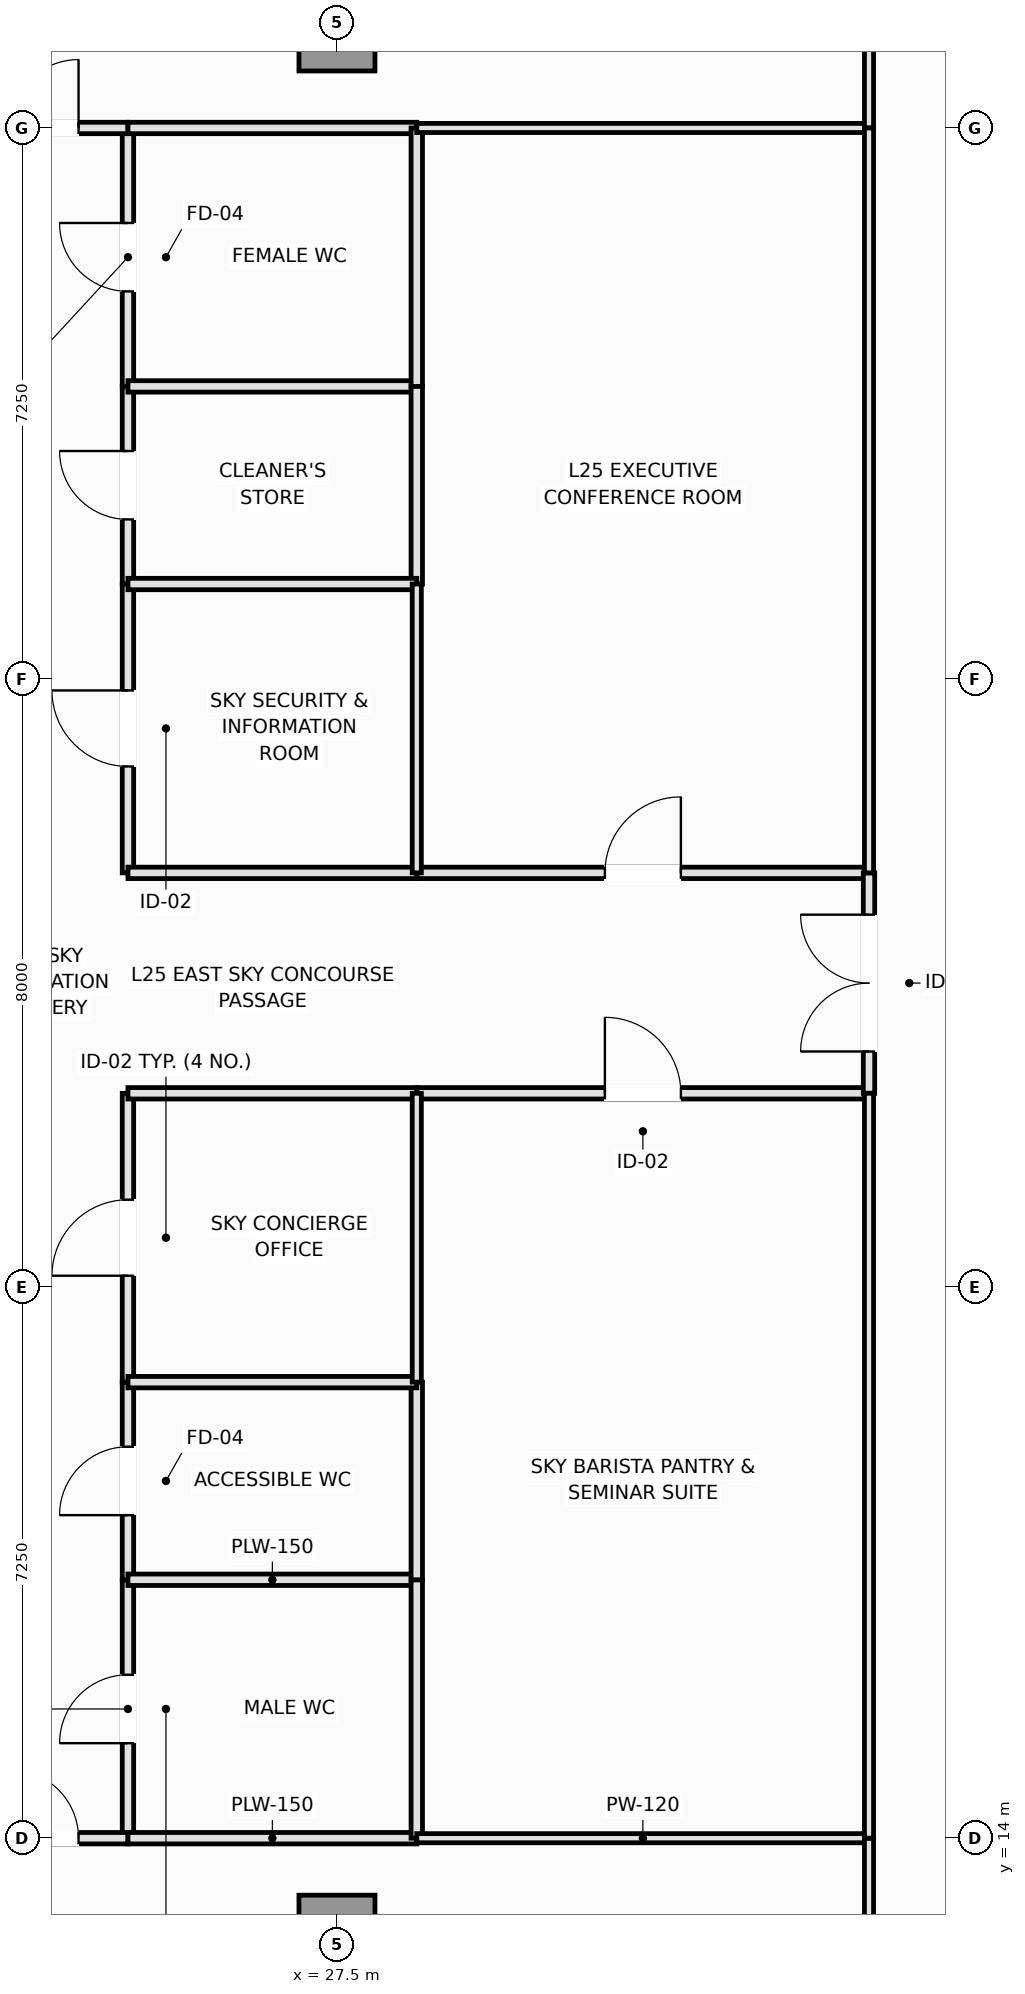
"""IFC4 building model, lengths in metres.
Left out: names, types, materials, properties, quantities, classifications, styles, units other than length and angle.
Written with IfcOpenShell. Run it as: python <this file> out.ifc"""

import sys

from ifc_helpers import new_model, si_unit, direction, frame, frame_2d, origin, origin_2d, place, context, subcontext, project, spatial, rectangle, extrude, element, fill, save


model = new_model("IFC4")
c1 = context("Model", 3, precision=1e-05, world=origin(), true_north=direction((0.0, 1.0)))
c2 = subcontext(c1, "Body", "Model", "MODEL_VIEW")
j1 = project(units=[si_unit("LENGTHUNIT", "METRE"), si_unit("PLANEANGLEUNIT", "RADIAN")], contexts=[c1])
p1 = place(None, origin())
s1 = spatial("IfcSite", under=j1, at=p1, CompositionType="ELEMENT")
p2 = place(p1, origin())
s2 = spatial("IfcBuilding", under=s1, at=p2, CompositionType="ELEMENT")
p3 = place(p2, frame((0.0, 0.0, 97.85)))
s3 = spatial("IfcBuildingStorey", under=s2, at=p3, CompositionType="ELEMENT", Elevation=97.85)
for number, where, z_axis, x_axis in (
    (1, (27.5, 12.75, 0.0), (0.0, 0.0, 1.0), (1.0, 0.0, 0.0)),
    (2, (27.5, 37.75, 0.0), (0.0, 0.0, 1.0), (1.0, 0.0, 0.0)),
):
    element("IfcColumn", number, at=place(p3, frame(where, z_axis=z_axis, x_axis=x_axis)), inside=s3, PredefinedType="COLUMN", context=c2, shape_type="SweptSolid", body=[
        extrude(rectangle(XDim=1.0, YDim=1.0, at=origin_2d()), origin(), (0.0, 0.0, 1.0), 4.4),
    ])
p4 = place(p3, frame((24.75, 14.0, 0.0), z_axis=(0.0, 0.0, 1.0), x_axis=(0.0, 1.0, 0.0)))
e3 = element("IfcWall", 3, at=p4, inside=s3, PredefinedType="PLUMBINGWALL", context=c2, shape_type="SweptSolid", body=[
    extrude(rectangle(XDim=3.4, YDim=0.15, at=frame_2d((1.7, 0.0))), origin(), (0.0, 0.0, 1.0), 4.22),
])
p5 = place(p4, frame((1.25, 0.0, 0.0)))
e4 = element("IfcOpeningElement", 4, at=p5, cuts=e3, PredefinedType="OPENING", context=c2, shape_type="SweptSolid", body=[
    extrude(rectangle(XDim=0.9, YDim=2.1, at=frame_2d((0.45, 1.05))), frame((0.0, 0.085, 0.0), z_axis=(0.0, -1.0, 0.0), x_axis=(1.0, 0.0, 0.0)), (0.0, 0.0, 1.0), 0.17),
])
p6 = place(p3, frame((24.75, 33.1, 0.0), z_axis=(0.0, 0.0, 1.0), x_axis=(0.0, 1.0, 0.0)))
e5 = element("IfcWall", 5, at=p6, inside=s3, PredefinedType="PLUMBINGWALL", context=c2, shape_type="SweptSolid", body=[
    extrude(rectangle(XDim=3.4, YDim=0.15, at=frame_2d((1.7, 0.0))), origin(), (0.0, 0.0, 1.0), 4.22),
])
p7 = place(p6, frame((1.25, 0.0, 0.0)))
e6 = element("IfcOpeningElement", 6, at=p7, cuts=e5, PredefinedType="OPENING", context=c2, shape_type="SweptSolid", body=[
    extrude(rectangle(XDim=0.9, YDim=2.1, at=frame_2d((0.45, 1.05))), frame((0.0, 0.085, 0.0), z_axis=(0.0, -1.0, 0.0), x_axis=(1.0, 0.0, 0.0)), (0.0, 0.0, 1.0), 0.17),
])
p8 = place(p3, frame((24.75, 17.4, 0.0), z_axis=(0.0, 0.0, 1.0), x_axis=(0.0, 1.0, 0.0)))
e7 = element("IfcWall", 7, at=p8, inside=s3, PredefinedType="PLUMBINGWALL", context=c2, shape_type="SweptSolid", body=[
    extrude(rectangle(XDim=2.6, YDim=0.15, at=frame_2d((1.3, 0.0))), origin(), (0.0, 0.0, 1.0), 4.22),
])
p9 = place(p8, frame((0.85, 0.0, 0.0)))
e8 = element("IfcOpeningElement", 8, at=p9, cuts=e7, PredefinedType="OPENING", context=c2, shape_type="SweptSolid", body=[
    extrude(rectangle(XDim=0.9, YDim=2.1, at=frame_2d((0.45, 1.05))), frame((0.0, 0.085, 0.0), z_axis=(0.0, -1.0, 0.0), x_axis=(1.0, 0.0, 0.0)), (0.0, 0.0, 1.0), 0.17),
])
p10 = place(p3, frame((24.75, 30.5, 0.0), z_axis=(0.0, 0.0, 1.0), x_axis=(0.0, 1.0, 0.0)))
e9 = element("IfcWall", 9, at=p10, inside=s3, PredefinedType="PLUMBINGWALL", context=c2, shape_type="SweptSolid", body=[
    extrude(rectangle(XDim=2.6, YDim=0.15, at=frame_2d((1.3, 0.0))), origin(), (0.0, 0.0, 1.0), 4.22),
])
p11 = place(p10, frame((0.85, 0.0, 0.0)))
e10 = element("IfcOpeningElement", 10, at=p11, cuts=e9, PredefinedType="OPENING", context=c2, shape_type="SweptSolid", body=[
    extrude(rectangle(XDim=0.9, YDim=2.1, at=frame_2d((0.45, 1.05))), frame((0.0, 0.085, 0.0), z_axis=(0.0, -1.0, 0.0), x_axis=(1.0, 0.0, 0.0)), (0.0, 0.0, 1.0), 0.17),
])
p12 = place(p3, frame((22.55, 14.0, 0.0), z_axis=(0.0, 0.0, 1.0), x_axis=(1.0, 0.0, 0.0)))
e11 = element("IfcWall", 11, at=p12, inside=s3, PredefinedType="PARTITIONING", context=c2, shape_type="SweptSolid", body=[
    extrude(rectangle(XDim=2.2, YDim=0.15, at=frame_2d((1.1, 0.0))), origin(), (0.0, 0.0, 1.0), 4.22),
])
p13 = place(p12, frame((0.65, 0.0, 0.0)))
e12 = element("IfcOpeningElement", 12, at=p13, cuts=e11, PredefinedType="OPENING", context=c2, shape_type="SweptSolid", body=[
    extrude(rectangle(XDim=0.9, YDim=2.1, at=frame_2d((0.45, 1.05))), frame((0.0, 0.085, 0.0), z_axis=(0.0, -1.0, 0.0), x_axis=(1.0, 0.0, 0.0)), (0.0, 0.0, 1.0), 0.17),
])
p14 = place(p3, frame((22.55, 36.5, 0.0), z_axis=(0.0, 0.0, 1.0), x_axis=(1.0, 0.0, 0.0)))
e13 = element("IfcWall", 13, at=p14, inside=s3, PredefinedType="PARTITIONING", context=c2, shape_type="SweptSolid", body=[
    extrude(rectangle(XDim=2.2, YDim=0.15, at=frame_2d((1.1, 0.0))), origin(), (0.0, 0.0, 1.0), 4.22),
])
p15 = place(p14, frame((0.65, 0.0, 0.0)))
e14 = element("IfcOpeningElement", 14, at=p15, cuts=e13, PredefinedType="OPENING", context=c2, shape_type="SweptSolid", body=[
    extrude(rectangle(XDim=0.9, YDim=2.1, at=frame_2d((0.45, 1.05))), frame((0.0, 0.085, 0.0), z_axis=(0.0, -1.0, 0.0), x_axis=(1.0, 0.0, 0.0)), (0.0, 0.0, 1.0), 0.17),
])
p16 = place(p3, frame((24.75, 20.0, 0.0), z_axis=(0.0, 0.0, 1.0), x_axis=(0.0, 1.0, 0.0)))
e15 = element("IfcWall", 15, at=p16, inside=s3, PredefinedType="PARTITIONING", context=c2, shape_type="SweptSolid", body=[
    extrude(rectangle(XDim=3.8, YDim=0.15, at=frame_2d((1.9, 0.0))), origin(), (0.0, 0.0, 1.0), 4.22),
])
p17 = place(p16, frame((1.4, 0.0, 0.0)))
e16 = element("IfcOpeningElement", 16, at=p17, cuts=e15, PredefinedType="OPENING", context=c2, shape_type="SweptSolid", body=[
    extrude(rectangle(XDim=1.0, YDim=2.15, at=frame_2d((0.5, 1.075))), frame((0.0, 0.085, 0.0), z_axis=(0.0, -1.0, 0.0), x_axis=(1.0, 0.0, 0.0)), (0.0, 0.0, 1.0), 0.17),
])
p18 = place(p3, frame((24.75, 26.7, 0.0), z_axis=(0.0, 0.0, 1.0), x_axis=(0.0, 1.0, 0.0)))
e17 = element("IfcWall", 17, at=p18, inside=s3, PredefinedType="PARTITIONING", context=c2, shape_type="SweptSolid", body=[
    extrude(rectangle(XDim=3.8, YDim=0.15, at=frame_2d((1.9, 0.0))), origin(), (0.0, 0.0, 1.0), 4.22),
])
p19 = place(p18, frame((1.4, 0.0, 0.0)))
e18 = element("IfcOpeningElement", 18, at=p19, cuts=e17, PredefinedType="OPENING", context=c2, shape_type="SweptSolid", body=[
    extrude(rectangle(XDim=1.0, YDim=2.15, at=frame_2d((0.5, 1.075))), frame((0.0, 0.085, 0.0), z_axis=(0.0, -1.0, 0.0), x_axis=(1.0, 0.0, 0.0)), (0.0, 0.0, 1.0), 0.17),
])
p20 = place(p3, frame((28.55, 23.8, 0.0), z_axis=(0.0, 0.0, 1.0), x_axis=(1.0, 0.0, 0.0)))
e19 = element("IfcWall", 19, at=p20, inside=s3, PredefinedType="PARTITIONING", context=c2, shape_type="SweptSolid", body=[
    extrude(rectangle(XDim=5.95, YDim=0.15, at=frame_2d((2.975, 0.0))), origin(), (0.0, 0.0, 1.0), 4.22),
])
p21 = place(p20, frame((2.475, 0.0, 0.0)))
e20 = element("IfcOpeningElement", 20, at=p21, cuts=e19, PredefinedType="OPENING", context=c2, shape_type="SweptSolid", body=[
    extrude(rectangle(XDim=1.0, YDim=2.15, at=frame_2d((0.5, 1.075))), frame((0.0, 0.085, 0.0), z_axis=(0.0, -1.0, 0.0), x_axis=(1.0, 0.0, 0.0)), (0.0, 0.0, 1.0), 0.17),
])
p22 = place(p3, frame((28.55, 26.7, 0.0), z_axis=(0.0, 0.0, 1.0), x_axis=(1.0, 0.0, 0.0)))
e21 = element("IfcWall", 21, at=p22, inside=s3, PredefinedType="PARTITIONING", context=c2, shape_type="SweptSolid", body=[
    extrude(rectangle(XDim=5.95, YDim=0.15, at=frame_2d((2.975, 0.0))), origin(), (0.0, 0.0, 1.0), 4.22),
])
p23 = place(p22, frame((2.475, 0.0, 0.0)))
e22 = element("IfcOpeningElement", 22, at=p23, cuts=e21, PredefinedType="OPENING", context=c2, shape_type="SweptSolid", body=[
    extrude(rectangle(XDim=1.0, YDim=2.15, at=frame_2d((0.5, 1.075))), frame((0.0, 0.085, 0.0), z_axis=(0.0, -1.0, 0.0), x_axis=(1.0, 0.0, 0.0)), (0.0, 0.0, 1.0), 0.17),
])
p24 = place(p3, frame((34.5, 23.8, 0.0), z_axis=(0.0, 0.0, 1.0), x_axis=(0.0, 1.0, 0.0)))
e23 = element("IfcWall", 23, at=p24, inside=s3, PredefinedType="PARTITIONING", context=c2, shape_type="SweptSolid", body=[
    extrude(rectangle(XDim=2.9, YDim=0.15, at=frame_2d((1.45, 0.0))), origin(), (0.0, 0.0, 1.0), 4.22),
])
p25 = place(p24, frame((0.55, 0.0, 0.0)))
e24 = element("IfcOpeningElement", 24, at=p25, cuts=e23, PredefinedType="OPENING", context=c2, shape_type="SweptSolid", body=[
    extrude(rectangle(XDim=1.8, YDim=2.2, at=frame_2d((0.9, 1.1))), frame((0.0, 0.085, 0.0), z_axis=(0.0, -1.0, 0.0), x_axis=(1.0, 0.0, 0.0)), (0.0, 0.0, 1.0), 0.17),
])
for number, where, z_axis, x_axis in (
    (25, (24.75, 23.8, 0.0), (0.0, 0.0, 1.0), (1.0, 0.0, 0.0)),
    (26, (24.75, 26.7, 0.0), (0.0, 0.0, 1.0), (1.0, 0.0, 0.0)),
):
    element("IfcWall", number, at=place(p3, frame(where, z_axis=z_axis, x_axis=x_axis)), inside=s3, PredefinedType="PARTITIONING", context=c2, shape_type="SweptSolid", body=[
        extrude(rectangle(XDim=3.8, YDim=0.15, at=frame_2d((1.9, 0.0))), origin(), (0.0, 0.0, 1.0), 4.22),
    ])
for number, where, z_axis, x_axis in (
    (27, (24.75, 17.4, 0.0), (0.0, 0.0, 1.0), (1.0, 0.0, 0.0)),
    (28, (24.75, 14.0, 0.0), (0.0, 0.0, 1.0), (1.0, 0.0, 0.0)),
):
    element("IfcWall", number, at=place(p3, frame(where, z_axis=z_axis, x_axis=x_axis)), inside=s3, PredefinedType="PLUMBINGWALL", context=c2, shape_type="SweptSolid", body=[
        extrude(rectangle(XDim=3.8, YDim=0.15, at=frame_2d((1.9, 0.0))), origin(), (0.0, 0.0, 1.0), 4.22),
    ])
p26 = place(p3, frame((28.55, 14.0, 0.0), z_axis=(0.0, 0.0, 1.0), x_axis=(0.0, 1.0, 0.0)))
e29 = element("IfcWall", 29, at=p26, inside=s3, PredefinedType="PLUMBINGWALL", context=c2, shape_type="SweptSolid", body=[
    extrude(rectangle(XDim=3.4, YDim=0.15, at=frame_2d((1.7, 0.0))), origin(), (0.0, 0.0, 1.0), 4.22),
])
for number, where, z_axis, x_axis in (
    (30, (24.75, 33.1, 0.0), (0.0, 0.0, 1.0), (1.0, 0.0, 0.0)),
    (31, (24.75, 36.5, 0.0), (0.0, 0.0, 1.0), (1.0, 0.0, 0.0)),
):
    element("IfcWall", number, at=place(p3, frame(where, z_axis=z_axis, x_axis=x_axis)), inside=s3, PredefinedType="PLUMBINGWALL", context=c2, shape_type="SweptSolid", body=[
        extrude(rectangle(XDim=3.8, YDim=0.15, at=frame_2d((1.9, 0.0))), origin(), (0.0, 0.0, 1.0), 4.22),
    ])
p27 = place(p3, frame((28.55, 33.1, 0.0), z_axis=(0.0, 0.0, 1.0), x_axis=(0.0, 1.0, 0.0)))
e32 = element("IfcWall", 32, at=p27, inside=s3, PredefinedType="PLUMBINGWALL", context=c2, shape_type="SweptSolid", body=[
    extrude(rectangle(XDim=3.4, YDim=0.15, at=frame_2d((1.7, 0.0))), origin(), (0.0, 0.0, 1.0), 4.22),
])
p28 = place(p3, frame((28.55, 17.4, 0.0), z_axis=(0.0, 0.0, 1.0), x_axis=(0.0, 1.0, 0.0)))
e33 = element("IfcWall", 33, at=p28, inside=s3, PredefinedType="PLUMBINGWALL", context=c2, shape_type="SweptSolid", body=[
    extrude(rectangle(XDim=2.6, YDim=0.15, at=frame_2d((1.3, 0.0))), origin(), (0.0, 0.0, 1.0), 4.22),
])
p29 = place(p3, frame((24.75, 20.0, 0.0), z_axis=(0.0, 0.0, 1.0), x_axis=(1.0, 0.0, 0.0)))
e34 = element("IfcWall", 34, at=p29, inside=s3, PredefinedType="PLUMBINGWALL", context=c2, shape_type="SweptSolid", body=[
    extrude(rectangle(XDim=3.8, YDim=0.15, at=frame_2d((1.9, 0.0))), origin(), (0.0, 0.0, 1.0), 4.22),
])
p30 = place(p3, frame((28.55, 30.5, 0.0), z_axis=(0.0, 0.0, 1.0), x_axis=(0.0, 1.0, 0.0)))
e35 = element("IfcWall", 35, at=p30, inside=s3, PredefinedType="PLUMBINGWALL", context=c2, shape_type="SweptSolid", body=[
    extrude(rectangle(XDim=2.6, YDim=0.15, at=frame_2d((1.3, 0.0))), origin(), (0.0, 0.0, 1.0), 4.22),
])
p31 = place(p3, frame((24.75, 30.5, 0.0), z_axis=(0.0, 0.0, 1.0), x_axis=(1.0, 0.0, 0.0)))
e36 = element("IfcWall", 36, at=p31, inside=s3, PredefinedType="PLUMBINGWALL", context=c2, shape_type="SweptSolid", body=[
    extrude(rectangle(XDim=3.8, YDim=0.15, at=frame_2d((1.9, 0.0))), origin(), (0.0, 0.0, 1.0), 4.22),
])
p32 = place(p3, frame((28.55, 14.0, 0.0), z_axis=(0.0, 0.0, 1.0), x_axis=(1.0, 0.0, 0.0)))
e37 = element("IfcWall", 37, at=p32, inside=s3, PredefinedType="PARTITIONING", context=c2, shape_type="SweptSolid", body=[
    extrude(rectangle(XDim=5.95, YDim=0.12, at=frame_2d((2.975, 0.0))), origin(), (0.0, 0.0, 1.0), 4.22),
])
p33 = place(p3, frame((34.5, 3.51, 0.0), z_axis=(0.0, 0.0, 1.0), x_axis=(0.0, 1.0, 0.0)))
e38 = element("IfcWall", 38, at=p33, inside=s3, PredefinedType="PARTITIONING", context=c2, shape_type="SweptSolid", body=[
    extrude(rectangle(XDim=10.49, YDim=0.12, at=frame_2d((5.245, 0.0))), origin(), (0.0, 0.0, 1.0), 3.82),
])
p34 = place(p3, frame((28.55, 36.5, 0.0), z_axis=(0.0, 0.0, 1.0), x_axis=(1.0, 0.0, 0.0)))
e39 = element("IfcWall", 39, at=p34, inside=s3, PredefinedType="PARTITIONING", context=c2, shape_type="SweptSolid", body=[
    extrude(rectangle(XDim=5.95, YDim=0.12, at=frame_2d((2.975, 0.0))), origin(), (0.0, 0.0, 1.0), 4.22),
])
p35 = place(p3, frame((34.5, 36.5, 0.0), z_axis=(0.0, 0.0, 1.0), x_axis=(0.0, 1.0, 0.0)))
e40 = element("IfcWall", 40, at=p35, inside=s3, PredefinedType="PARTITIONING", context=c2, shape_type="SweptSolid", body=[
    extrude(rectangle(XDim=9.99, YDim=0.12, at=frame_2d((4.995, 0.0))), origin(), (0.0, 0.0, 1.0), 3.82),
])
p36 = place(p3, frame((34.5, 14.0, 0.0), z_axis=(0.0, 0.0, 1.0), x_axis=(0.0, 1.0, 0.0)))
e41 = element("IfcWall", 41, at=p36, inside=s3, PredefinedType="PARTITIONING", context=c2, shape_type="SweptSolid", body=[
    extrude(rectangle(XDim=9.8, YDim=0.12, at=frame_2d((4.9, 0.0))), origin(), (0.0, 0.0, 1.0), 4.22),
])
p37 = place(p3, frame((28.55, 20.0, 0.0), z_axis=(0.0, 0.0, 1.0), x_axis=(0.0, 1.0, 0.0)))
e42 = element("IfcWall", 42, at=p37, inside=s3, PredefinedType="PARTITIONING", context=c2, shape_type="SweptSolid", body=[
    extrude(rectangle(XDim=3.8, YDim=0.12, at=frame_2d((1.9, 0.0))), origin(), (0.0, 0.0, 1.0), 4.22),
])
p38 = place(p3, frame((34.5, 26.7, 0.0), z_axis=(0.0, 0.0, 1.0), x_axis=(0.0, 1.0, 0.0)))
e43 = element("IfcWall", 43, at=p38, inside=s3, PredefinedType="PARTITIONING", context=c2, shape_type="SweptSolid", body=[
    extrude(rectangle(XDim=9.8, YDim=0.12, at=frame_2d((4.9, 0.0))), origin(), (0.0, 0.0, 1.0), 4.22),
])
p39 = place(p3, frame((28.55, 26.7, 0.0), z_axis=(0.0, 0.0, 1.0), x_axis=(0.0, 1.0, 0.0)))
e44 = element("IfcWall", 44, at=p39, inside=s3, PredefinedType="PARTITIONING", context=c2, shape_type="SweptSolid", body=[
    extrude(rectangle(XDim=3.8, YDim=0.12, at=frame_2d((1.9, 0.0))), origin(), (0.0, 0.0, 1.0), 4.22),
])
p40 = place(p5, origin())
e45 = element("IfcDoor", 45, at=p40, inside=s3, OperationType="SINGLE_SWING_LEFT", PredefinedType="DOOR", context=c2, shape_type="SweptSolid", body=[
    extrude(rectangle(XDim=0.9, YDim=2.1, at=frame_2d((0.45, 1.05))), frame((0.0, 0.025, 0.0), z_axis=(0.0, -1.0, 0.0), x_axis=(1.0, 0.0, 0.0)), (0.0, 0.0, 1.0), 0.05),
])
fill(e4, e45)
p41 = place(p7, origin())
e46 = element("IfcDoor", 46, at=p41, inside=s3, OperationType="SINGLE_SWING_RIGHT", PredefinedType="DOOR", context=c2, shape_type="SweptSolid", body=[
    extrude(rectangle(XDim=0.9, YDim=2.1, at=frame_2d((0.45, 1.05))), frame((0.0, 0.025, 0.0), z_axis=(0.0, -1.0, 0.0), x_axis=(1.0, 0.0, 0.0)), (0.0, 0.0, 1.0), 0.05),
])
fill(e6, e46)
p42 = place(p9, origin())
e47 = element("IfcDoor", 47, at=p42, inside=s3, OperationType="SINGLE_SWING_LEFT", PredefinedType="DOOR", context=c2, shape_type="SweptSolid", body=[
    extrude(rectangle(XDim=0.9, YDim=2.1, at=frame_2d((0.45, 1.05))), frame((0.0, 0.025, 0.0), z_axis=(0.0, -1.0, 0.0), x_axis=(1.0, 0.0, 0.0)), (0.0, 0.0, 1.0), 0.05),
])
fill(e8, e47)
p43 = place(p11, origin())
e48 = element("IfcDoor", 48, at=p43, inside=s3, OperationType="SINGLE_SWING_RIGHT", PredefinedType="DOOR", context=c2, shape_type="SweptSolid", body=[
    extrude(rectangle(XDim=0.9, YDim=2.1, at=frame_2d((0.45, 1.05))), frame((0.0, 0.025, 0.0), z_axis=(0.0, -1.0, 0.0), x_axis=(1.0, 0.0, 0.0)), (0.0, 0.0, 1.0), 0.05),
])
fill(e10, e48)
p44 = place(p13, origin())
e49 = element("IfcDoor", 49, at=p44, inside=s3, OperationType="SINGLE_SWING_LEFT", PredefinedType="DOOR", context=c2, shape_type="SweptSolid", body=[
    extrude(rectangle(XDim=0.9, YDim=2.1, at=frame_2d((0.45, 1.05))), frame((0.0, 0.025, 0.0), z_axis=(0.0, -1.0, 0.0), x_axis=(1.0, 0.0, 0.0)), (0.0, 0.0, 1.0), 0.05),
])
fill(e12, e49)
p45 = place(p15, origin())
e50 = element("IfcDoor", 50, at=p45, inside=s3, OperationType="SINGLE_SWING_RIGHT", PredefinedType="DOOR", context=c2, shape_type="SweptSolid", body=[
    extrude(rectangle(XDim=0.9, YDim=2.1, at=frame_2d((0.45, 1.05))), frame((0.0, 0.025, 0.0), z_axis=(0.0, -1.0, 0.0), x_axis=(1.0, 0.0, 0.0)), (0.0, 0.0, 1.0), 0.05),
])
fill(e14, e50)
p46 = place(p17, origin())
e51 = element("IfcDoor", 51, at=p46, inside=s3, OperationType="SINGLE_SWING_LEFT", PredefinedType="DOOR", context=c2, shape_type="SweptSolid", body=[
    extrude(rectangle(XDim=1.0, YDim=2.15, at=frame_2d((0.5, 1.075))), frame((0.0, 0.025, 0.0), z_axis=(0.0, -1.0, 0.0), x_axis=(1.0, 0.0, 0.0)), (0.0, 0.0, 1.0), 0.05),
])
fill(e16, e51)
p47 = place(p19, origin())
e52 = element("IfcDoor", 52, at=p47, inside=s3, OperationType="SINGLE_SWING_RIGHT", PredefinedType="DOOR", context=c2, shape_type="SweptSolid", body=[
    extrude(rectangle(XDim=1.0, YDim=2.15, at=frame_2d((0.5, 1.075))), frame((0.0, 0.025, 0.0), z_axis=(0.0, -1.0, 0.0), x_axis=(1.0, 0.0, 0.0)), (0.0, 0.0, 1.0), 0.05),
])
fill(e18, e52)
p48 = place(p21, origin())
e53 = element("IfcDoor", 53, at=p48, inside=s3, OperationType="SINGLE_SWING_LEFT", PredefinedType="DOOR", context=c2, shape_type="SweptSolid", body=[
    extrude(rectangle(XDim=1.0, YDim=2.15, at=frame_2d((0.5, 1.075))), frame((0.0, 0.025, 0.0), z_axis=(0.0, -1.0, 0.0), x_axis=(1.0, 0.0, 0.0)), (0.0, 0.0, 1.0), 0.05),
])
fill(e20, e53)
p49 = place(p23, origin())
e54 = element("IfcDoor", 54, at=p49, inside=s3, OperationType="SINGLE_SWING_RIGHT", PredefinedType="DOOR", context=c2, shape_type="SweptSolid", body=[
    extrude(rectangle(XDim=1.0, YDim=2.15, at=frame_2d((0.5, 1.075))), frame((0.0, 0.025, 0.0), z_axis=(0.0, -1.0, 0.0), x_axis=(1.0, 0.0, 0.0)), (0.0, 0.0, 1.0), 0.05),
])
fill(e22, e54)
p50 = place(p25, origin())
e55 = element("IfcDoor", 55, at=p50, inside=s3, OperationType="DOUBLE_DOOR_SINGLE_SWING", PredefinedType="DOOR", context=c2, shape_type="SweptSolid", body=[
    extrude(rectangle(XDim=1.8, YDim=2.2, at=frame_2d((0.9, 1.1))), frame((0.0, 0.025, 0.0), z_axis=(0.0, -1.0, 0.0), x_axis=(1.0, 0.0, 0.0)), (0.0, 0.0, 1.0), 0.05),
])
fill(e24, e55)
save(model, sys.argv[1])
